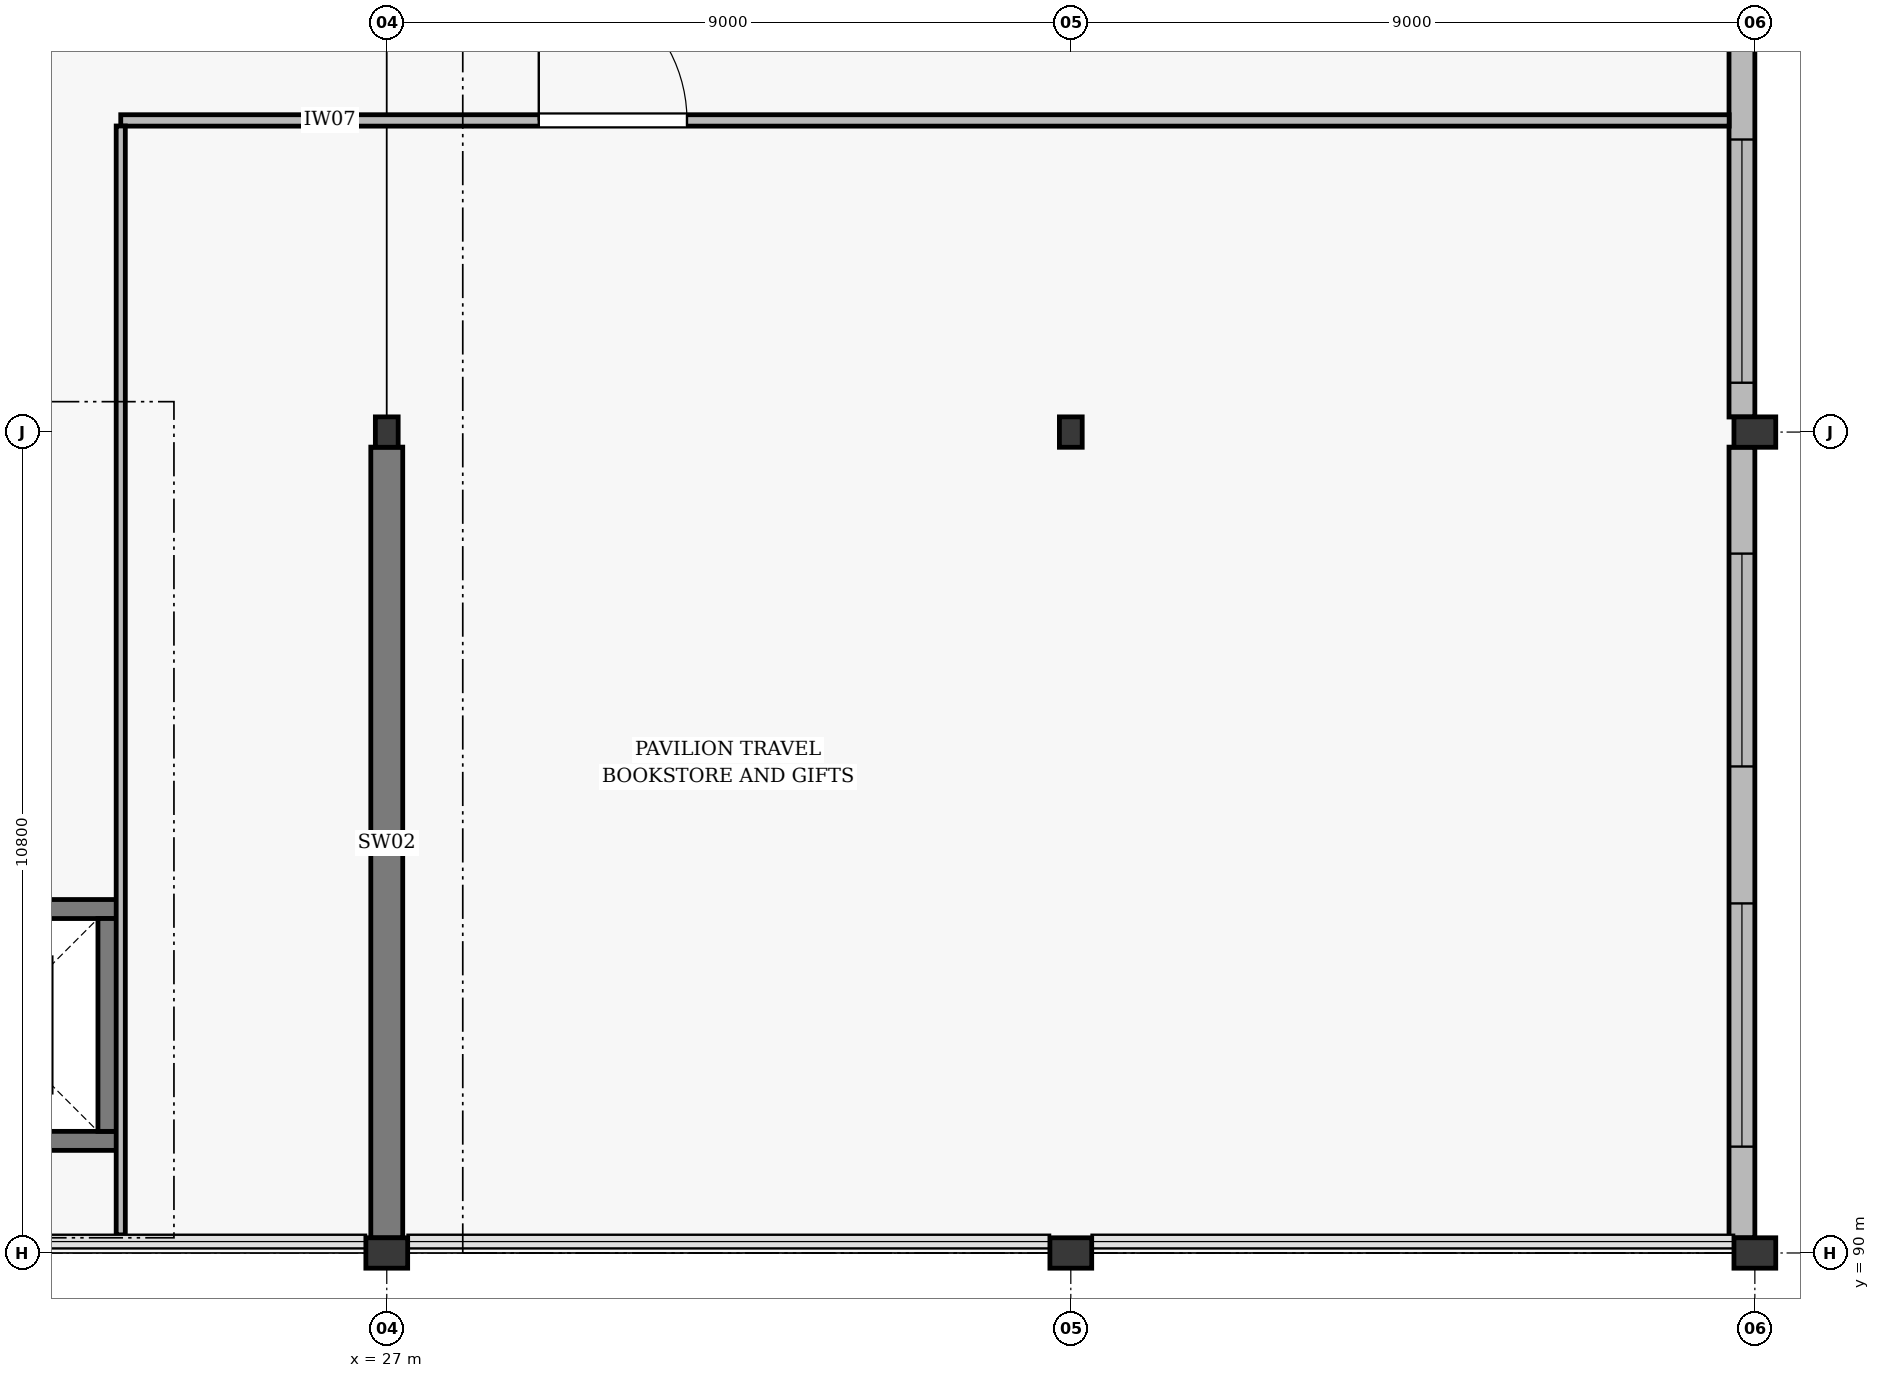
"""IFC4 building model, lengths in metres.
Left out: names, types, materials, properties, quantities, classifications, styles, units other than length and angle.
Written with IfcOpenShell. Run it as: python <this file> out.ifc"""

import sys

from ifc_helpers import new_model, si_unit, direction, frame, frame_2d, origin, origin_2d, place, context, subcontext, project, spatial, rectangle, i_section, extrude, element, fill, save


model = new_model("IFC4")
c1 = context("Model", 3, precision=1e-05, world=origin(), true_north=direction((0.0, 1.0)))
c2 = subcontext(c1, "Body", "Model", "MODEL_VIEW")
j1 = project(units=[si_unit("LENGTHUNIT", "METRE"), si_unit("PLANEANGLEUNIT", "RADIAN")], contexts=[c1])
p1 = place(None, origin())
s1 = spatial("IfcSite", under=j1, at=p1, CompositionType="ELEMENT")
p2 = place(p1, origin())
s2 = spatial("IfcBuilding", under=s1, at=p2, CompositionType="ELEMENT")
p3 = place(p2, frame((0.0, 0.0, 6.6)))
s3 = spatial("IfcBuildingStorey", under=s2, at=p3, CompositionType="ELEMENT", Elevation=6.6)
p4 = place(p3, frame((27.0, 90.0, 0.0), z_axis=(0.0, 0.0, 1.0), x_axis=(1.0, 0.0, 0.0)))
e1 = element("IfcColumn", 1, at=p4, inside=s3, PredefinedType="PILASTER", context=c2, shape_type="SweptSolid", body=[
    extrude(rectangle(XDim=0.55, YDim=0.4, at=origin_2d()), origin(), (0.0, 0.0, 1.0), 6.0),
])
p5 = place(p3, frame((27.0, 100.8, 0.0), z_axis=(0.0, 0.0, 1.0), x_axis=(1.0, 0.0, 0.0)))
e2 = element("IfcColumn", 2, at=p5, inside=s3, PredefinedType="COLUMN", context=c2, shape_type="SweptSolid", body=[
    extrude(i_section(OverallWidth=0.3, OverallDepth=0.4, WebThickness=0.013, FlangeThickness=0.024, at=origin_2d()), origin(), (0.0, 0.0, 1.0), 6.0),
])
p6 = place(p3, frame((36.0, 90.0, 0.0), z_axis=(0.0, 0.0, 1.0), x_axis=(1.0, 0.0, 0.0)))
e3 = element("IfcColumn", 3, at=p6, inside=s3, PredefinedType="PILASTER", context=c2, shape_type="SweptSolid", body=[
    extrude(rectangle(XDim=0.55, YDim=0.4, at=origin_2d()), origin(), (0.0, 0.0, 1.0), 6.0),
])
p7 = place(p3, frame((36.0, 100.8, 0.0), z_axis=(0.0, 0.0, 1.0), x_axis=(1.0, 0.0, 0.0)))
e4 = element("IfcColumn", 4, at=p7, inside=s3, PredefinedType="COLUMN", context=c2, shape_type="SweptSolid", body=[
    extrude(i_section(OverallWidth=0.3, OverallDepth=0.4, WebThickness=0.013, FlangeThickness=0.024, at=origin_2d()), origin(), (0.0, 0.0, 1.0), 6.0),
])
for number, where, z_axis, x_axis in (
    (5, (45.0, 90.0, 0.0), (0.0, 0.0, 1.0), (1.0, 0.0, 0.0)),
    (6, (45.0, 100.8, 0.0), (0.0, 0.0, 1.0), (1.0, 0.0, 0.0)),
):
    element("IfcColumn", number, at=place(p3, frame(where, z_axis=z_axis, x_axis=x_axis)), inside=s3, PredefinedType="PILASTER", context=c2, shape_type="SweptSolid", body=[
        extrude(rectangle(XDim=0.55, YDim=0.4, at=origin_2d()), origin(), (0.0, 0.0, 1.0), 6.0),
    ])
p8 = place(p3, frame((27.0, 90.198, 0.0), z_axis=(0.0, 0.0, 1.0), x_axis=(0.0, 1.0, 0.0)))
e7 = element("IfcWall", 7, at=p8, inside=s3, PredefinedType="SHEAR", context=c2, shape_type="SweptSolid", body=[
    extrude(rectangle(XDim=10.404, YDim=0.42, at=frame_2d((5.202, 0.0))), origin(), (0.0, 0.0, 1.0), 5.75),
])
p9 = place(p3, frame((44.83, 90.198, 0.0), z_axis=(0.0, 0.0, 1.0), x_axis=(0.0, 1.0, 0.0)))
e8 = element("IfcWall", 8, at=p9, inside=s3, PredefinedType="STANDARD", context=c2, shape_type="SweptSolid", body=[
    extrude(rectangle(XDim=10.404, YDim=0.34, at=frame_2d((5.202, 0.0))), origin(), (0.0, 0.0, 1.0), 5.25),
])
p10 = place(p9, frame((1.201, 0.0, 0.75)))
e9 = element("IfcOpeningElement", 9, at=p10, cuts=e8, PredefinedType="OPENING", context=c2, shape_type="SweptSolid", body=[
    extrude(rectangle(XDim=3.2, YDim=2.8, at=frame_2d((1.6, 1.4))), frame((0.0, 0.182, 0.0), z_axis=(0.0, -1.0, 0.0), x_axis=(1.0, 0.0, 0.0)), (0.0, 0.0, 1.0), 0.364),
])
p11 = place(p9, frame((6.203, 0.0, 0.75)))
e10 = element("IfcOpeningElement", 10, at=p11, cuts=e8, PredefinedType="OPENING", context=c2, shape_type="SweptSolid", body=[
    extrude(rectangle(XDim=2.8, YDim=2.6, at=frame_2d((1.4, 1.3))), frame((0.0, 0.182, 0.0), z_axis=(0.0, -1.0, 0.0), x_axis=(1.0, 0.0, 0.0)), (0.0, 0.0, 1.0), 0.364),
])
p12 = place(p3, frame((44.83, 100.998, 0.0), z_axis=(0.0, 0.0, 1.0), x_axis=(0.0, 1.0, 0.0)))
e11 = element("IfcWall", 11, at=p12, inside=s3, PredefinedType="STANDARD", context=c2, shape_type="SweptSolid", body=[
    extrude(rectangle(XDim=10.404, YDim=0.34, at=frame_2d((5.202, 0.0))), origin(), (0.0, 0.0, 1.0), 5.25),
])
p13 = place(p12, frame((0.451, 0.0, 0.75)))
e12 = element("IfcOpeningElement", 12, at=p13, cuts=e11, PredefinedType="OPENING", context=c2, shape_type="SweptSolid", body=[
    extrude(rectangle(XDim=3.2, YDim=2.8, at=frame_2d((1.6, 1.4))), frame((0.0, 0.182, 0.0), z_axis=(0.0, -1.0, 0.0), x_axis=(1.0, 0.0, 0.0)), (0.0, 0.0, 1.0), 0.364),
])
p14 = place(p12, frame((4.853, 0.0, 0.75)))
e13 = element("IfcOpeningElement", 13, at=p14, cuts=e11, PredefinedType="OPENING", context=c2, shape_type="SweptSolid", body=[
    extrude(rectangle(XDim=2.8, YDim=2.6, at=frame_2d((1.4, 1.3))), frame((0.0, 0.182, 0.0), z_axis=(0.0, -1.0, 0.0), x_axis=(1.0, 0.0, 0.0)), (0.0, 0.0, 1.0), 0.364),
])
p15 = place(p3, frame((20.15, 91.475, 0.0), z_axis=(0.0, 0.0, 1.0), x_axis=(1.0, 0.0, 0.0)))
e14 = element("IfcWall", 14, at=p15, inside=s3, PredefinedType="SOLIDWALL", context=c2, shape_type="SweptSolid", body=[
    extrude(rectangle(XDim=3.3, YDim=0.25, at=frame_2d((1.65, 0.0))), origin(), (0.0, 0.0, 1.0), 6.0),
])
p16 = place(p3, frame((20.15, 94.525, 0.0), z_axis=(0.0, 0.0, 1.0), x_axis=(1.0, 0.0, 0.0)))
e15 = element("IfcWall", 15, at=p16, inside=s3, PredefinedType="SOLIDWALL", context=c2, shape_type="SweptSolid", body=[
    extrude(rectangle(XDim=3.3, YDim=0.25, at=frame_2d((1.65, 0.0))), origin(), (0.0, 0.0, 1.0), 6.0),
])
p17 = place(p16, frame((0.95, 0.0, 0.005)))
e16 = element("IfcOpeningElement", 16, at=p17, cuts=e15, PredefinedType="OPENING", context=c2, shape_type="SweptSolid", body=[
    extrude(rectangle(XDim=1.4, YDim=2.25, at=frame_2d((0.7, 1.125))), frame((0.0, 0.137, 0.0), z_axis=(0.0, -1.0, 0.0), x_axis=(1.0, 0.0, 0.0)), (0.0, 0.0, 1.0), 0.274),
])
p18 = place(p3, frame((23.325, 91.6, 0.0), z_axis=(0.0, 0.0, 1.0), x_axis=(0.0, 1.0, 0.0)))
e17 = element("IfcWall", 17, at=p18, inside=s3, PredefinedType="SOLIDWALL", context=c2, shape_type="SweptSolid", body=[
    extrude(rectangle(XDim=2.8, YDim=0.25, at=frame_2d((1.4, 0.0))), origin(), (0.0, 0.0, 1.0), 6.0),
])
p19 = place(p3, frame((23.5, 104.9, 0.0), z_axis=(0.0, 0.0, 1.0), x_axis=(1.0, 0.0, 0.0)))
e18 = element("IfcWall", 18, at=p19, inside=s3, PredefinedType="PARTITIONING", context=c2, shape_type="SweptSolid", body=[
    extrude(rectangle(XDim=21.162, YDim=0.15, at=frame_2d((10.581, 0.0))), origin(), (0.0, 0.0, 1.0), 5.29),
])
p20 = place(p19, frame((5.5, 0.0, 0.005)))
e19 = element("IfcOpeningElement", 19, at=p20, cuts=e18, PredefinedType="OPENING", context=c2, shape_type="SweptSolid", body=[
    extrude(rectangle(XDim=1.95, YDim=2.3, at=frame_2d((0.975, 1.15))), frame((0.0, 0.087, 0.0), z_axis=(0.0, -1.0, 0.0), x_axis=(1.0, 0.0, 0.0)), (0.0, 0.0, 1.0), 0.174),
])
p21 = place(p3, frame((23.5, 90.238, 0.0), z_axis=(0.0, 0.0, 1.0), x_axis=(0.0, 1.0, 0.0)))
e20 = element("IfcWall", 20, at=p21, inside=s3, PredefinedType="PARTITIONING", context=c2, shape_type="SweptSolid", body=[
    extrude(rectangle(XDim=14.589, YDim=0.12, at=frame_2d((7.294, 0.0))), origin(), (0.0, 0.0, 1.0), 5.24),
])
p22 = place(p10, origin())
e21 = element("IfcWindow", 21, at=p22, inside=s3, PartitioningType="DOUBLE_PANEL_VERTICAL", PredefinedType="WINDOW", context=c2, shape_type="SweptSolid", body=[
    extrude(rectangle(XDim=3.2, YDim=2.8, at=frame_2d((1.6, 1.4))), frame((0.0, 0.03, 0.0), z_axis=(0.0, -1.0, 0.0), x_axis=(1.0, 0.0, 0.0)), (0.0, 0.0, 1.0), 0.06),
])
fill(e9, e21)
p23 = place(p11, origin())
e22 = element("IfcWindow", 22, at=p23, inside=s3, PartitioningType="DOUBLE_PANEL_VERTICAL", PredefinedType="WINDOW", context=c2, shape_type="SweptSolid", body=[
    extrude(rectangle(XDim=2.8, YDim=2.6, at=frame_2d((1.4, 1.3))), frame((0.0, 0.03, 0.0), z_axis=(0.0, -1.0, 0.0), x_axis=(1.0, 0.0, 0.0)), (0.0, 0.0, 1.0), 0.06),
])
fill(e10, e22)
p24 = place(p13, origin())
e23 = element("IfcWindow", 23, at=p24, inside=s3, PartitioningType="DOUBLE_PANEL_VERTICAL", PredefinedType="WINDOW", context=c2, shape_type="SweptSolid", body=[
    extrude(rectangle(XDim=3.2, YDim=2.8, at=frame_2d((1.6, 1.4))), frame((0.0, 0.03, 0.0), z_axis=(0.0, -1.0, 0.0), x_axis=(1.0, 0.0, 0.0)), (0.0, 0.0, 1.0), 0.06),
])
fill(e12, e23)
p25 = place(p20, origin())
e24 = element("IfcDoor", 24, at=p25, inside=s3, OperationType="DOUBLE_DOOR_SINGLE_SWING", PredefinedType="DOOR", context=c2, shape_type="SweptSolid", body=[
    extrude(rectangle(XDim=1.95, YDim=2.3, at=frame_2d((0.975, 1.15))), frame((0.0, 0.025, 0.0), z_axis=(0.0, -1.0, 0.0), x_axis=(1.0, 0.0, 0.0)), (0.0, 0.0, 1.0), 0.05),
])
fill(e19, e24)
save(model, sys.argv[1])
